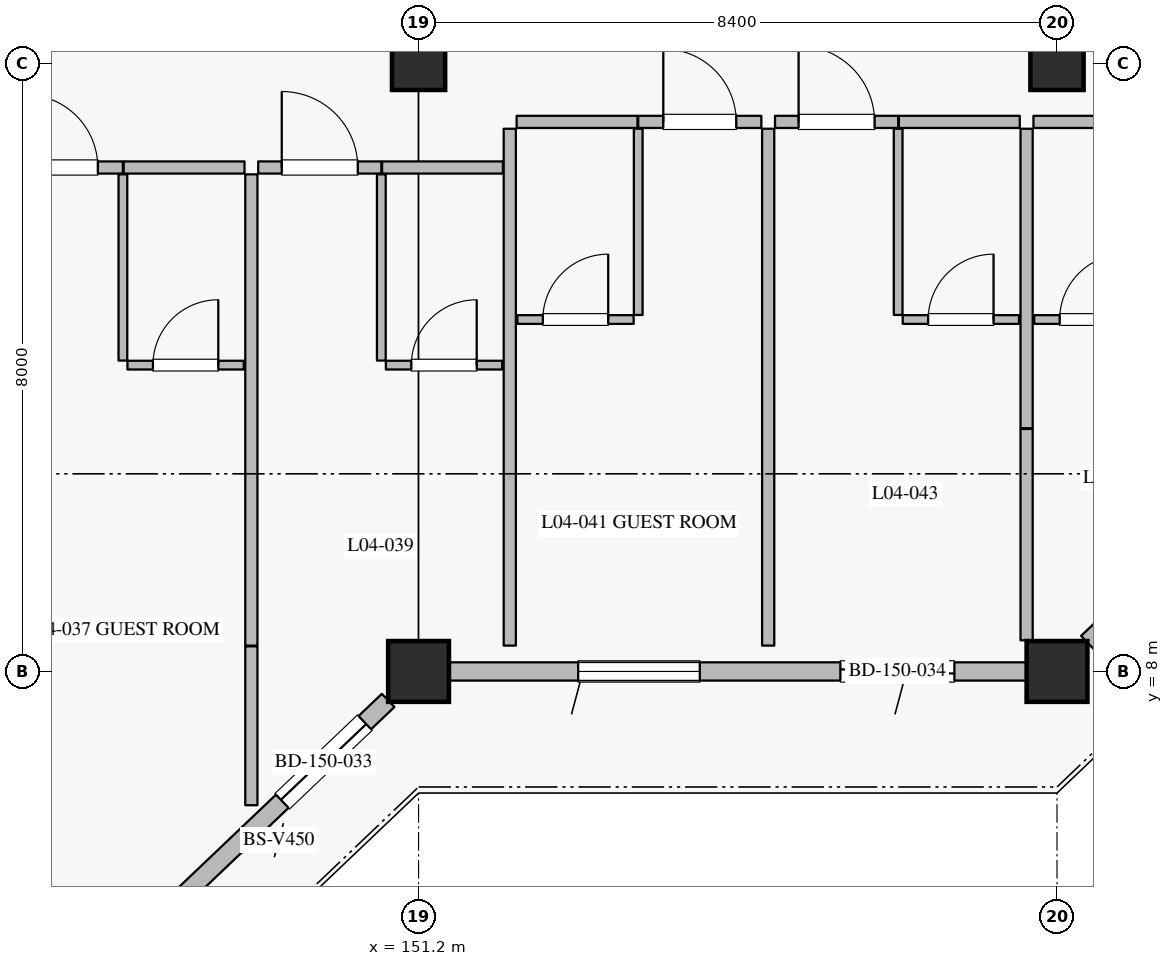
"""IFC4 building model, lengths in metres.
Left out: names, types, materials, properties, quantities, classifications, styles, units other than length and angle.
Written with IfcOpenShell. Run it as: python <this file> out.ifc"""

import sys

from ifc_helpers import new_model, si_unit, direction, frame, frame_2d, origin, origin_2d, place, context, subcontext, project, spatial, rectangle, extrude, element, fill, save


model = new_model("IFC4")
c1 = context("Model", 3, precision=1e-05, world=origin(), true_north=direction((0.0, 1.0)))
c2 = subcontext(c1, "Body", "Model", "MODEL_VIEW")
j1 = project(units=[si_unit("LENGTHUNIT", "METRE"), si_unit("PLANEANGLEUNIT", "RADIAN")], contexts=[c1])
p1 = place(None, origin())
s1 = spatial("IfcSite", under=j1, at=p1, CompositionType="ELEMENT")
p2 = place(p1, origin())
s2 = spatial("IfcBuilding", under=s1, at=p2, CompositionType="ELEMENT")
p3 = place(p2, frame((0.0, 0.0, 21.0)))
s3 = spatial("IfcBuildingStorey", under=s2, at=p3, CompositionType="ELEMENT", Elevation=21.0)
for number, where, z_axis, x_axis in (
    (1, (151.2, 8.0, 0.0), (0.0, 0.0, 1.0), (1.0, 0.0, 0.0)),
    (2, (159.6, 8.0, 0.0), (0.0, 0.0, 1.0), (1.0, 0.0, 0.0)),
):
    element("IfcColumn", number, at=place(p3, frame(where, z_axis=z_axis, x_axis=x_axis)), inside=s3, PredefinedType="COLUMN", context=c2, shape_type="SweptSolid", body=[
        extrude(rectangle(XDim=0.8, YDim=0.8, at=origin_2d()), origin(), (0.0, 0.0, 1.0), 4.2),
    ])
for number, where, z_axis, x_axis in (
    (3, (151.2, 16.0, 0.0), (0.0, 0.0, 1.0), (1.0, 0.0, 0.0)),
    (4, (159.6, 16.0, 0.0), (0.0, 0.0, 1.0), (1.0, 0.0, 0.0)),
):
    element("IfcColumn", number, at=place(p3, frame(where, z_axis=z_axis, x_axis=x_axis)), inside=s3, PredefinedType="COLUMN", context=c2, shape_type="SweptSolid", body=[
        extrude(rectangle(XDim=0.7, YDim=0.7, at=origin_2d()), origin(), (0.0, 0.0, 1.0), 4.2),
    ])
p4 = place(p3, frame((150.8, 7.619, 0.0), z_axis=(0.0, 0.0, 1.0), x_axis=(-0.724156739794, -0.689635422677, 0.0)))
e5 = element("IfcWall", 5, at=p4, inside=s3, PredefinedType="SOLIDWALL", context=c2, shape_type="SweptSolid", body=[
    extrude(rectangle(XDim=10.495, YDim=0.24, at=frame_2d((5.248, 0.0))), origin(), (0.0, 0.0, 1.0), 3.53),
])
p5 = place(p4, frame((0.424, 0.0, 0.0)))
e6 = element("IfcOpeningElement", 6, at=p5, cuts=e5, PredefinedType="OPENING", context=c2, shape_type="SweptSolid", body=[
    extrude(rectangle(XDim=1.5, YDim=2.25, at=frame_2d((0.75, 1.125))), frame((0.0, 0.13, 0.0), z_axis=(0.0, -1.0, 0.0), x_axis=(1.0, 0.0, 0.0)), (0.0, 0.0, 1.0), 0.26),
])
p6 = place(p4, frame((4.033, 0.0, 0.8)))
e7 = element("IfcOpeningElement", 7, at=p6, cuts=e5, PredefinedType="OPENING", context=c2, shape_type="SweptSolid", body=[
    extrude(rectangle(XDim=1.6, YDim=1.6, at=frame_2d((0.8, 0.8))), frame((0.0, 0.13, 0.0), z_axis=(0.0, -1.0, 0.0), x_axis=(1.0, 0.0, 0.0)), (0.0, 0.0, 1.0), 0.26),
])
p7 = place(p4, frame((8.107, 0.0, 0.8)))
e8 = element("IfcOpeningElement", 8, at=p7, cuts=e5, PredefinedType="OPENING", context=c2, shape_type="SweptSolid", body=[
    extrude(rectangle(XDim=1.6, YDim=1.6, at=frame_2d((0.8, 0.8))), frame((0.0, 0.13, 0.0), z_axis=(0.0, -1.0, 0.0), x_axis=(1.0, 0.0, 0.0)), (0.0, 0.0, 1.0), 0.26),
])
p8 = place(p3, frame((159.2, 8.0, 0.0), z_axis=(0.0, 0.0, 1.0), x_axis=(-1.0, 0.0, 0.0)))
e9 = element("IfcWall", 9, at=p8, inside=s3, PredefinedType="SOLIDWALL", context=c2, shape_type="SweptSolid", body=[
    extrude(rectangle(XDim=7.6, YDim=0.24, at=frame_2d((3.8, 0.0))), origin(), (0.0, 0.0, 1.0), 3.53),
])
p9 = place(p8, frame((0.95, 0.0, 0.0)))
e10 = element("IfcOpeningElement", 10, at=p9, cuts=e9, PredefinedType="OPENING", context=c2, shape_type="SweptSolid", body=[
    extrude(rectangle(XDim=1.5, YDim=2.25, at=frame_2d((0.75, 1.125))), frame((0.0, 0.13, 0.0), z_axis=(0.0, -1.0, 0.0), x_axis=(1.0, 0.0, 0.0)), (0.0, 0.0, 1.0), 0.26),
])
p10 = place(p8, frame((4.3, 0.0, 0.8)))
e11 = element("IfcOpeningElement", 11, at=p10, cuts=e9, PredefinedType="OPENING", context=c2, shape_type="SweptSolid", body=[
    extrude(rectangle(XDim=1.6, YDim=1.6, at=frame_2d((0.8, 0.8))), frame((0.0, 0.13, 0.0), z_axis=(0.0, -1.0, 0.0), x_axis=(1.0, 0.0, 0.0)), (0.0, 0.0, 1.0), 0.26),
])
p11 = place(p3, frame((167.6, 15.619, 0.0), z_axis=(0.0, 0.0, 1.0), x_axis=(-0.724156739794, -0.689635422677, 0.0)))
e12 = element("IfcWall", 12, at=p11, inside=s3, PredefinedType="SOLIDWALL", context=c2, shape_type="SweptSolid", body=[
    extrude(rectangle(XDim=10.495, YDim=0.24, at=frame_2d((5.248, 0.0))), origin(), (0.0, 0.0, 1.0), 3.53),
])
p12 = place(p11, frame((0.286, 0.0, 0.0)))
e13 = element("IfcOpeningElement", 13, at=p12, cuts=e12, PredefinedType="OPENING", context=c2, shape_type="SweptSolid", body=[
    extrude(rectangle(XDim=1.5, YDim=2.25, at=frame_2d((0.75, 1.125))), frame((0.0, 0.13, 0.0), z_axis=(0.0, -1.0, 0.0), x_axis=(1.0, 0.0, 0.0)), (0.0, 0.0, 1.0), 0.26),
])
p13 = place(p11, frame((3.757, 0.0, 0.8)))
e14 = element("IfcOpeningElement", 14, at=p13, cuts=e12, PredefinedType="OPENING", context=c2, shape_type="SweptSolid", body=[
    extrude(rectangle(XDim=1.6, YDim=1.6, at=frame_2d((0.8, 0.8))), frame((0.0, 0.13, 0.0), z_axis=(0.0, -1.0, 0.0), x_axis=(1.0, 0.0, 0.0)), (0.0, 0.0, 1.0), 0.26),
])
p14 = place(p11, frame((7.969, 0.0, 0.8)))
e15 = element("IfcOpeningElement", 15, at=p14, cuts=e12, PredefinedType="OPENING", context=c2, shape_type="SweptSolid", body=[
    extrude(rectangle(XDim=1.6, YDim=1.6, at=frame_2d((0.8, 0.8))), frame((0.0, 0.13, 0.0), z_axis=(0.0, -1.0, 0.0), x_axis=(1.0, 0.0, 0.0)), (0.0, 0.0, 1.0), 0.26),
])
p15 = place(p3, frame((145.69, 14.63, 0.0), z_axis=(0.0, 0.0, 1.0), x_axis=(1.0, 0.0, 0.0)))
e16 = element("IfcWall", 16, at=p15, inside=s3, PredefinedType="PARTITIONING", context=c2, shape_type="SweptSolid", body=[
    extrude(rectangle(XDim=1.62, YDim=0.16, at=frame_2d((0.81, 0.0))), origin(), (0.0, 0.0, 1.0), 3.965),
])
p16 = place(p15, frame((0.33, 0.0, 0.0)))
e17 = element("IfcOpeningElement", 17, at=p16, cuts=e16, PredefinedType="OPENING", context=c2, shape_type="SweptSolid", body=[
    extrude(rectangle(XDim=0.96, YDim=2.2, at=frame_2d((0.48, 1.1))), frame((0.0, 0.09, 0.0), z_axis=(0.0, -1.0, 0.0), x_axis=(1.0, 0.0, 0.0)), (0.0, 0.0, 1.0), 0.18),
])
p17 = place(p3, frame((147.32, 14.63, 0.0), z_axis=(0.0, 0.0, 1.0), x_axis=(1.0, 0.0, 0.0)))
e18 = element("IfcWall", 18, at=p17, inside=s3, PredefinedType="PARTITIONING", context=c2, shape_type="SweptSolid", body=[
    extrude(rectangle(XDim=1.59, YDim=0.16, at=frame_2d((0.795, 0.0))), origin(), (0.0, 0.0, 1.0), 3.965),
])
p18 = place(p3, frame((147.31, 12.09, 0.0), z_axis=(0.0, 0.0, 1.0), x_axis=(0.0, 1.0, 0.0)))
e19 = element("IfcWall", 19, at=p18, inside=s3, PredefinedType="PARTITIONING", context=c2, shape_type="SweptSolid", body=[
    extrude(rectangle(XDim=2.45, YDim=0.115, at=frame_2d((1.225, 0.0))), origin(), (0.0, 0.0, 1.0), 3.965),
])
p19 = place(p3, frame((147.37, 12.03, 0.0), z_axis=(0.0, 0.0, 1.0), x_axis=(1.0, 0.0, 0.0)))
e20 = element("IfcWall", 20, at=p19, inside=s3, PredefinedType="PARTITIONING", context=c2, shape_type="SweptSolid", body=[
    extrude(rectangle(XDim=1.53, YDim=0.115, at=frame_2d((0.765, 0.0))), origin(), (0.0, 0.0, 1.0), 3.965),
])
p20 = place(p19, frame((0.335, 0.0, 0.0)))
e21 = element("IfcOpeningElement", 21, at=p20, cuts=e20, PredefinedType="OPENING", context=c2, shape_type="SweptSolid", body=[
    extrude(rectangle(XDim=0.86, YDim=2.12, at=frame_2d((0.43, 1.06))), frame((0.0, 0.067, 0.0), z_axis=(0.0, -1.0, 0.0), x_axis=(1.0, 0.0, 0.0)), (0.0, 0.0, 1.0), 0.135),
])
p21 = place(p3, frame((149.0, 6.24, 0.0), z_axis=(0.0, 0.0, 1.0), x_axis=(0.0, 1.0, 0.0)))
e22 = element("IfcWall", 22, at=p21, inside=s3, PredefinedType="PARTITIONING", context=c2, shape_type="SweptSolid", body=[
    extrude(rectangle(XDim=2.09, YDim=0.16, at=frame_2d((1.045, 0.0))), origin(), (0.0, 0.0, 1.0), 3.965),
])
p22 = place(p3, frame((149.09, 14.63, 0.0), z_axis=(0.0, 0.0, 1.0), x_axis=(1.0, 0.0, 0.0)))
e23 = element("IfcWall", 23, at=p22, inside=s3, PredefinedType="PARTITIONING", context=c2, shape_type="SweptSolid", body=[
    extrude(rectangle(XDim=1.62, YDim=0.16, at=frame_2d((0.81, 0.0))), origin(), (0.0, 0.0, 1.0), 3.965),
])
p23 = place(p22, frame((0.31, 0.0, 0.0)))
e24 = element("IfcOpeningElement", 24, at=p23, cuts=e23, PredefinedType="OPENING", context=c2, shape_type="SweptSolid", body=[
    extrude(rectangle(XDim=1.0, YDim=2.25, at=frame_2d((0.5, 1.125))), frame((0.0, 0.09, 0.0), z_axis=(0.0, -1.0, 0.0), x_axis=(1.0, 0.0, 0.0)), (0.0, 0.0, 1.0), 0.18),
])
p24 = place(p3, frame((150.72, 14.63, 0.0), z_axis=(0.0, 0.0, 1.0), x_axis=(1.0, 0.0, 0.0)))
e25 = element("IfcWall", 25, at=p24, inside=s3, PredefinedType="PARTITIONING", context=c2, shape_type="SweptSolid", body=[
    extrude(rectangle(XDim=1.59, YDim=0.16, at=frame_2d((0.795, 0.0))), origin(), (0.0, 0.0, 1.0), 3.965),
])
p25 = place(p3, frame((150.71, 12.09, 0.0), z_axis=(0.0, 0.0, 1.0), x_axis=(0.0, 1.0, 0.0)))
e26 = element("IfcWall", 26, at=p25, inside=s3, PredefinedType="PARTITIONING", context=c2, shape_type="SweptSolid", body=[
    extrude(rectangle(XDim=2.45, YDim=0.115, at=frame_2d((1.225, 0.0))), origin(), (0.0, 0.0, 1.0), 3.965),
])
p26 = place(p3, frame((150.77, 12.03, 0.0), z_axis=(0.0, 0.0, 1.0), x_axis=(1.0, 0.0, 0.0)))
e27 = element("IfcWall", 27, at=p26, inside=s3, PredefinedType="PARTITIONING", context=c2, shape_type="SweptSolid", body=[
    extrude(rectangle(XDim=1.53, YDim=0.115, at=frame_2d((0.765, 0.0))), origin(), (0.0, 0.0, 1.0), 3.965),
])
p27 = place(p26, frame((0.335, 0.0, 0.0)))
e28 = element("IfcOpeningElement", 28, at=p27, cuts=e27, PredefinedType="OPENING", context=c2, shape_type="SweptSolid", body=[
    extrude(rectangle(XDim=0.86, YDim=2.12, at=frame_2d((0.43, 1.06))), frame((0.0, 0.067, 0.0), z_axis=(0.0, -1.0, 0.0), x_axis=(1.0, 0.0, 0.0)), (0.0, 0.0, 1.0), 0.135),
])
p28 = place(p3, frame((149.0, 8.34, 0.0), z_axis=(0.0, 0.0, 1.0), x_axis=(0.0, 1.0, 0.0)))
e29 = element("IfcWall", 29, at=p28, inside=s3, PredefinedType="PARTITIONING", context=c2, shape_type="SweptSolid", body=[
    extrude(rectangle(XDim=6.2, YDim=0.16, at=frame_2d((3.1, 0.0))), origin(), (0.0, 0.0, 1.0), 3.965),
])
p29 = place(p3, frame((152.49, 15.23, 0.0), z_axis=(0.0, 0.0, 1.0), x_axis=(1.0, 0.0, 0.0)))
e30 = element("IfcWall", 30, at=p29, inside=s3, PredefinedType="PARTITIONING", context=c2, shape_type="SweptSolid", body=[
    extrude(rectangle(XDim=1.59, YDim=0.16, at=frame_2d((0.795, 0.0))), origin(), (0.0, 0.0, 1.0), 3.965),
])
p30 = place(p3, frame((154.09, 15.23, 0.0), z_axis=(0.0, 0.0, 1.0), x_axis=(1.0, 0.0, 0.0)))
e31 = element("IfcWall", 31, at=p30, inside=s3, PredefinedType="PARTITIONING", context=c2, shape_type="SweptSolid", body=[
    extrude(rectangle(XDim=1.62, YDim=0.16, at=frame_2d((0.81, 0.0))), origin(), (0.0, 0.0, 1.0), 3.965),
])
p31 = place(p30, frame((0.33, 0.0, 0.0)))
e32 = element("IfcOpeningElement", 32, at=p31, cuts=e31, PredefinedType="OPENING", context=c2, shape_type="SweptSolid", body=[
    extrude(rectangle(XDim=0.96, YDim=2.2, at=frame_2d((0.48, 1.1))), frame((0.0, 0.09, 0.0), z_axis=(0.0, -1.0, 0.0), x_axis=(1.0, 0.0, 0.0)), (0.0, 0.0, 1.0), 0.18),
])
p32 = place(p3, frame((154.09, 12.69, 0.0), z_axis=(0.0, 0.0, 1.0), x_axis=(0.0, 1.0, 0.0)))
e33 = element("IfcWall", 33, at=p32, inside=s3, PredefinedType="PARTITIONING", context=c2, shape_type="SweptSolid", body=[
    extrude(rectangle(XDim=2.45, YDim=0.115, at=frame_2d((1.225, 0.0))), origin(), (0.0, 0.0, 1.0), 3.965),
])
p33 = place(p3, frame((152.5, 12.63, 0.0), z_axis=(0.0, 0.0, 1.0), x_axis=(1.0, 0.0, 0.0)))
e34 = element("IfcWall", 34, at=p33, inside=s3, PredefinedType="PARTITIONING", context=c2, shape_type="SweptSolid", body=[
    extrude(rectangle(XDim=1.53, YDim=0.115, at=frame_2d((0.765, 0.0))), origin(), (0.0, 0.0, 1.0), 3.965),
])
p34 = place(p33, frame((0.335, 0.0, 0.0)))
e35 = element("IfcOpeningElement", 35, at=p34, cuts=e34, PredefinedType="OPENING", context=c2, shape_type="SweptSolid", body=[
    extrude(rectangle(XDim=0.86, YDim=2.12, at=frame_2d((0.43, 1.06))), frame((0.0, 0.067, 0.0), z_axis=(0.0, -1.0, 0.0), x_axis=(1.0, 0.0, 0.0)), (0.0, 0.0, 1.0), 0.135),
])
p35 = place(p3, frame((152.4, 8.34, 0.0), z_axis=(0.0, 0.0, 1.0), x_axis=(0.0, 1.0, 0.0)))
e36 = element("IfcWall", 36, at=p35, inside=s3, PredefinedType="PARTITIONING", context=c2, shape_type="SweptSolid", body=[
    extrude(rectangle(XDim=6.8, YDim=0.16, at=frame_2d((3.4, 0.0))), origin(), (0.0, 0.0, 1.0), 3.965),
])
p36 = place(p3, frame((155.89, 15.23, 0.0), z_axis=(0.0, 0.0, 1.0), x_axis=(1.0, 0.0, 0.0)))
e37 = element("IfcWall", 37, at=p36, inside=s3, PredefinedType="PARTITIONING", context=c2, shape_type="SweptSolid", body=[
    extrude(rectangle(XDim=1.62, YDim=0.16, at=frame_2d((0.81, 0.0))), origin(), (0.0, 0.0, 1.0), 3.965),
])
p37 = place(p36, frame((0.31, 0.0, 0.0)))
e38 = element("IfcOpeningElement", 38, at=p37, cuts=e37, PredefinedType="OPENING", context=c2, shape_type="SweptSolid", body=[
    extrude(rectangle(XDim=1.0, YDim=2.25, at=frame_2d((0.5, 1.125))), frame((0.0, 0.09, 0.0), z_axis=(0.0, -1.0, 0.0), x_axis=(1.0, 0.0, 0.0)), (0.0, 0.0, 1.0), 0.18),
])
p38 = place(p3, frame((157.52, 15.23, 0.0), z_axis=(0.0, 0.0, 1.0), x_axis=(1.0, 0.0, 0.0)))
e39 = element("IfcWall", 39, at=p38, inside=s3, PredefinedType="PARTITIONING", context=c2, shape_type="SweptSolid", body=[
    extrude(rectangle(XDim=1.59, YDim=0.16, at=frame_2d((0.795, 0.0))), origin(), (0.0, 0.0, 1.0), 3.965),
])
p39 = place(p3, frame((157.51, 12.69, 0.0), z_axis=(0.0, 0.0, 1.0), x_axis=(0.0, 1.0, 0.0)))
e40 = element("IfcWall", 40, at=p39, inside=s3, PredefinedType="PARTITIONING", context=c2, shape_type="SweptSolid", body=[
    extrude(rectangle(XDim=2.45, YDim=0.115, at=frame_2d((1.225, 0.0))), origin(), (0.0, 0.0, 1.0), 3.965),
])
p40 = place(p3, frame((157.57, 12.63, 0.0), z_axis=(0.0, 0.0, 1.0), x_axis=(1.0, 0.0, 0.0)))
e41 = element("IfcWall", 41, at=p40, inside=s3, PredefinedType="PARTITIONING", context=c2, shape_type="SweptSolid", body=[
    extrude(rectangle(XDim=1.53, YDim=0.115, at=frame_2d((0.765, 0.0))), origin(), (0.0, 0.0, 1.0), 3.965),
])
p41 = place(p40, frame((0.335, 0.0, 0.0)))
e42 = element("IfcOpeningElement", 42, at=p41, cuts=e41, PredefinedType="OPENING", context=c2, shape_type="SweptSolid", body=[
    extrude(rectangle(XDim=0.86, YDim=2.12, at=frame_2d((0.43, 1.06))), frame((0.0, 0.067, 0.0), z_axis=(0.0, -1.0, 0.0), x_axis=(1.0, 0.0, 0.0)), (0.0, 0.0, 1.0), 0.135),
])
p42 = place(p3, frame((155.8, 8.34, 0.0), z_axis=(0.0, 0.0, 1.0), x_axis=(0.0, 1.0, 0.0)))
e43 = element("IfcWall", 43, at=p42, inside=s3, PredefinedType="PARTITIONING", context=c2, shape_type="SweptSolid", body=[
    extrude(rectangle(XDim=6.8, YDim=0.16, at=frame_2d((3.4, 0.0))), origin(), (0.0, 0.0, 1.0), 3.965),
])
p43 = place(p3, frame((159.2, 8.41, 0.0), z_axis=(0.0, 0.0, 1.0), x_axis=(0.0, 1.0, 0.0)))
e44 = element("IfcWall", 44, at=p43, inside=s3, PredefinedType="PARTITIONING", context=c2, shape_type="SweptSolid", body=[
    extrude(rectangle(XDim=2.78, YDim=0.16, at=frame_2d((1.39, 0.0))), origin(), (0.0, 0.0, 1.0), 3.965),
])
p44 = place(p3, frame((159.29, 15.23, 0.0), z_axis=(0.0, 0.0, 1.0), x_axis=(1.0, 0.0, 0.0)))
e45 = element("IfcWall", 45, at=p44, inside=s3, PredefinedType="PARTITIONING", context=c2, shape_type="SweptSolid", body=[
    extrude(rectangle(XDim=1.59, YDim=0.16, at=frame_2d((0.795, 0.0))), origin(), (0.0, 0.0, 1.0), 3.965),
])
p45 = place(p3, frame((159.3, 12.63, 0.0), z_axis=(0.0, 0.0, 1.0), x_axis=(1.0, 0.0, 0.0)))
e46 = element("IfcWall", 46, at=p45, inside=s3, PredefinedType="PARTITIONING", context=c2, shape_type="SweptSolid", body=[
    extrude(rectangle(XDim=1.53, YDim=0.115, at=frame_2d((0.765, 0.0))), origin(), (0.0, 0.0, 1.0), 3.965),
])
p46 = place(p45, frame((0.335, 0.0, 0.0)))
e47 = element("IfcOpeningElement", 47, at=p46, cuts=e46, PredefinedType="OPENING", context=c2, shape_type="SweptSolid", body=[
    extrude(rectangle(XDim=0.86, YDim=2.12, at=frame_2d((0.43, 1.06))), frame((0.0, 0.067, 0.0), z_axis=(0.0, -1.0, 0.0), x_axis=(1.0, 0.0, 0.0)), (0.0, 0.0, 1.0), 0.135),
])
p47 = place(p3, frame((159.2, 11.2, 0.0), z_axis=(0.0, 0.0, 1.0), x_axis=(0.0, 1.0, 0.0)))
e48 = element("IfcWall", 48, at=p47, inside=s3, PredefinedType="PARTITIONING", context=c2, shape_type="SweptSolid", body=[
    extrude(rectangle(XDim=3.94, YDim=0.16, at=frame_2d((1.97, 0.0))), origin(), (0.0, 0.0, 1.0), 3.965),
])
p48 = place(p5, origin())
e49 = element("IfcDoor", 49, at=p48, inside=s3, OperationType="SLIDING_TO_LEFT", PredefinedType="DOOR", context=c2, shape_type="SweptSolid", body=[
    extrude(rectangle(XDim=1.5, YDim=2.25, at=frame_2d((0.75, 1.125))), frame((0.0, 0.025, 0.0), z_axis=(0.0, -1.0, 0.0), x_axis=(1.0, 0.0, 0.0)), (0.0, 0.0, 1.0), 0.05),
])
fill(e6, e49)
p49 = place(p9, origin())
e50 = element("IfcDoor", 50, at=p49, inside=s3, OperationType="SLIDING_TO_LEFT", PredefinedType="DOOR", context=c2, shape_type="SweptSolid", body=[
    extrude(rectangle(XDim=1.5, YDim=2.25, at=frame_2d((0.75, 1.125))), frame((0.0, 0.025, 0.0), z_axis=(0.0, -1.0, 0.0), x_axis=(1.0, 0.0, 0.0)), (0.0, 0.0, 1.0), 0.05),
])
fill(e10, e50)
p50 = place(p10, origin())
e51 = element("IfcWindow", 51, at=p50, inside=s3, PartitioningType="SINGLE_PANEL", PredefinedType="WINDOW", context=c2, shape_type="SweptSolid", body=[
    extrude(rectangle(XDim=1.6, YDim=1.6, at=frame_2d((0.8, 0.8))), frame((0.0, 0.03, 0.0), z_axis=(0.0, -1.0, 0.0), x_axis=(1.0, 0.0, 0.0)), (0.0, 0.0, 1.0), 0.06),
])
fill(e11, e51)
p51 = place(p16, origin())
e52 = element("IfcDoor", 52, at=p51, inside=s3, OperationType="SINGLE_SWING_LEFT", PredefinedType="DOOR", context=c2, shape_type="SweptSolid", body=[
    extrude(rectangle(XDim=0.96, YDim=2.2, at=frame_2d((0.48, 1.1))), frame((0.0, 0.025, 0.0), z_axis=(0.0, -1.0, 0.0), x_axis=(1.0, 0.0, 0.0)), (0.0, 0.0, 1.0), 0.05),
])
fill(e17, e52)
p52 = place(p20, origin())
e53 = element("IfcDoor", 53, at=p52, inside=s3, OperationType="SINGLE_SWING_RIGHT", PredefinedType="DOOR", context=c2, shape_type="SweptSolid", body=[
    extrude(rectangle(XDim=0.86, YDim=2.12, at=frame_2d((0.43, 1.06))), frame((0.0, 0.025, 0.0), z_axis=(0.0, -1.0, 0.0), x_axis=(1.0, 0.0, 0.0)), (0.0, 0.0, 1.0), 0.05),
])
fill(e21, e53)
p53 = place(p23, origin())
e54 = element("IfcDoor", 54, at=p53, inside=s3, OperationType="SINGLE_SWING_LEFT", PredefinedType="DOOR", context=c2, shape_type="SweptSolid", body=[
    extrude(rectangle(XDim=1.0, YDim=2.25, at=frame_2d((0.5, 1.125))), frame((0.0, 0.025, 0.0), z_axis=(0.0, -1.0, 0.0), x_axis=(1.0, 0.0, 0.0)), (0.0, 0.0, 1.0), 0.05),
])
fill(e24, e54)
p54 = place(p27, origin())
e55 = element("IfcDoor", 55, at=p54, inside=s3, OperationType="SINGLE_SWING_RIGHT", PredefinedType="DOOR", context=c2, shape_type="SweptSolid", body=[
    extrude(rectangle(XDim=0.86, YDim=2.12, at=frame_2d((0.43, 1.06))), frame((0.0, 0.025, 0.0), z_axis=(0.0, -1.0, 0.0), x_axis=(1.0, 0.0, 0.0)), (0.0, 0.0, 1.0), 0.05),
])
fill(e28, e55)
p55 = place(p31, origin())
e56 = element("IfcDoor", 56, at=p55, inside=s3, OperationType="SINGLE_SWING_LEFT", PredefinedType="DOOR", context=c2, shape_type="SweptSolid", body=[
    extrude(rectangle(XDim=0.96, YDim=2.2, at=frame_2d((0.48, 1.1))), frame((0.0, 0.025, 0.0), z_axis=(0.0, -1.0, 0.0), x_axis=(1.0, 0.0, 0.0)), (0.0, 0.0, 1.0), 0.05),
])
fill(e32, e56)
p56 = place(p34, origin())
e57 = element("IfcDoor", 57, at=p56, inside=s3, OperationType="SINGLE_SWING_RIGHT", PredefinedType="DOOR", context=c2, shape_type="SweptSolid", body=[
    extrude(rectangle(XDim=0.86, YDim=2.12, at=frame_2d((0.43, 1.06))), frame((0.0, 0.025, 0.0), z_axis=(0.0, -1.0, 0.0), x_axis=(1.0, 0.0, 0.0)), (0.0, 0.0, 1.0), 0.05),
])
fill(e35, e57)
p57 = place(p37, origin())
e58 = element("IfcDoor", 58, at=p57, inside=s3, OperationType="SINGLE_SWING_LEFT", PredefinedType="DOOR", context=c2, shape_type="SweptSolid", body=[
    extrude(rectangle(XDim=1.0, YDim=2.25, at=frame_2d((0.5, 1.125))), frame((0.0, 0.025, 0.0), z_axis=(0.0, -1.0, 0.0), x_axis=(1.0, 0.0, 0.0)), (0.0, 0.0, 1.0), 0.05),
])
fill(e38, e58)
p58 = place(p41, origin())
e59 = element("IfcDoor", 59, at=p58, inside=s3, OperationType="SINGLE_SWING_RIGHT", PredefinedType="DOOR", context=c2, shape_type="SweptSolid", body=[
    extrude(rectangle(XDim=0.86, YDim=2.12, at=frame_2d((0.43, 1.06))), frame((0.0, 0.025, 0.0), z_axis=(0.0, -1.0, 0.0), x_axis=(1.0, 0.0, 0.0)), (0.0, 0.0, 1.0), 0.05),
])
fill(e42, e59)
p59 = place(p46, origin())
e60 = element("IfcDoor", 60, at=p59, inside=s3, OperationType="SINGLE_SWING_RIGHT", PredefinedType="DOOR", context=c2, shape_type="SweptSolid", body=[
    extrude(rectangle(XDim=0.86, YDim=2.12, at=frame_2d((0.43, 1.06))), frame((0.0, 0.025, 0.0), z_axis=(0.0, -1.0, 0.0), x_axis=(1.0, 0.0, 0.0)), (0.0, 0.0, 1.0), 0.05),
])
fill(e47, e60)
save(model, sys.argv[1])
